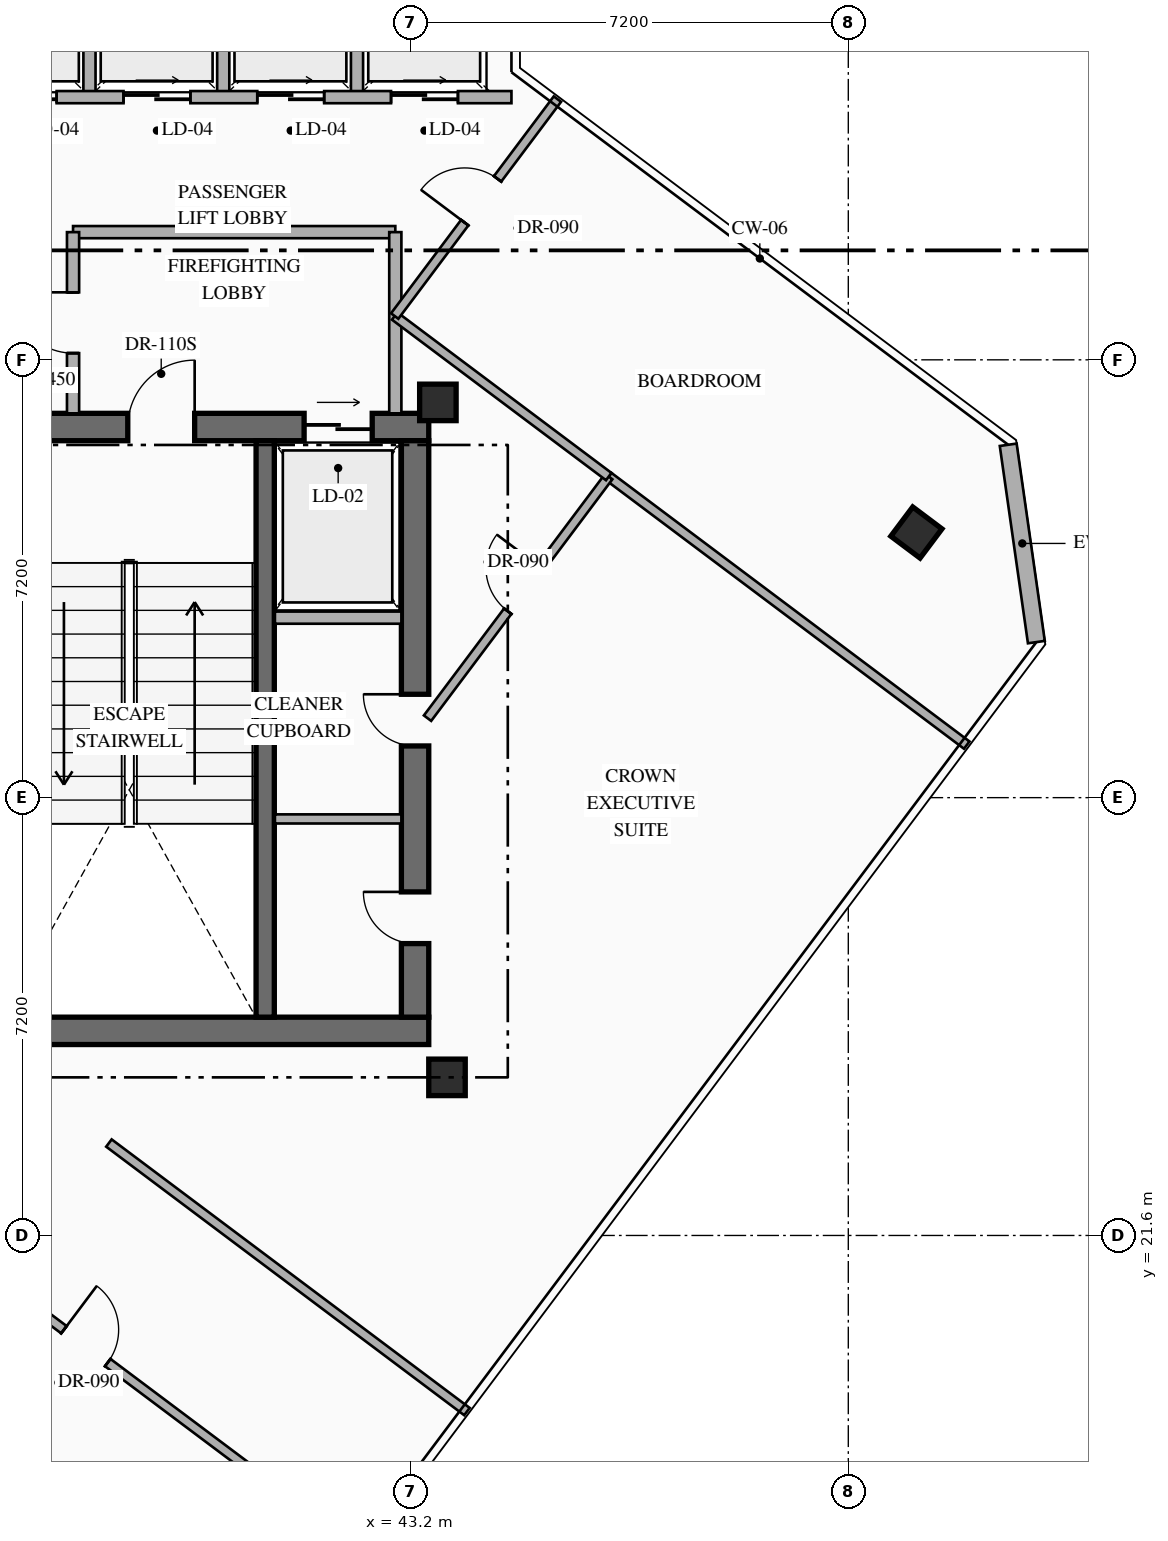
"""IFC4 building model, lengths in metres.
Left out: names, types, materials, properties, quantities, classifications, styles, units other than length and angle.
Written with IfcOpenShell. Run it as: python <this file> out.ifc"""

import sys

from ifc_helpers import new_model, si_unit, direction, frame, frame_2d, origin, origin_2d, place, context, subcontext, project, spatial, rectangle, hollow_rectangle, extrude, element, fill, save


model = new_model("IFC4")
c1 = context("Model", 3, precision=1e-05, world=origin(), true_north=direction((0.0, 1.0)))
c2 = subcontext(c1, "Body", "Model", "MODEL_VIEW")
j1 = project(units=[si_unit("LENGTHUNIT", "METRE"), si_unit("PLANEANGLEUNIT", "RADIAN")], contexts=[c1])
p1 = place(None, origin())
s1 = spatial("IfcSite", under=j1, at=p1, CompositionType="ELEMENT")
p2 = place(p1, origin())
s2 = spatial("IfcBuilding", under=s1, at=p2, CompositionType="ELEMENT")
p3 = place(p2, frame((0.0, 0.0, 269.95)))
s3 = spatial("IfcBuildingStorey", under=s2, at=p3, CompositionType="ELEMENT", Elevation=269.95)
p4 = place(p3, frame((36.04, 24.965, 0.0), z_axis=(0.0, 0.0, 1.0), x_axis=(1.0, 0.0, 0.0)))
e1 = element("IfcWall", 1, at=p4, inside=s3, PredefinedType="SHEAR", context=c2, shape_type="SweptSolid", body=[
    extrude(rectangle(XDim=7.46, YDim=0.45, at=frame_2d((3.73, 0.0))), origin(), (0.0, 0.0, 1.0), 4.0),
])
p5 = place(p3, frame((36.04, 34.895, 0.0), z_axis=(0.0, 0.0, 1.0), x_axis=(1.0, 0.0, 0.0)))
e2 = element("IfcWall", 2, at=p5, inside=s3, PredefinedType="SHEAR", context=c2, shape_type="SweptSolid", body=[
    extrude(rectangle(XDim=7.46, YDim=0.45, at=frame_2d((3.73, 0.0))), origin(), (0.0, 0.0, 1.0), 4.0),
])
p6 = place(p5, frame((2.51, 0.0, 0.0)))
e3 = element("IfcOpeningElement", 3, at=p6, cuts=e2, PredefinedType="OPENING", context=c2, shape_type="SweptSolid", body=[
    extrude(rectangle(XDim=1.1, YDim=2.2, at=frame_2d((0.55, 1.1))), frame((0.0, 0.235, 0.0), z_axis=(0.0, -1.0, 0.0), x_axis=(1.0, 0.0, 0.0)), (0.0, 0.0, 1.0), 0.47),
])
p7 = place(p5, frame((5.41, 0.0, 0.0)))
e4 = element("IfcOpeningElement", 4, at=p7, cuts=e2, PredefinedType="OPENING", context=c2, shape_type="SweptSolid", body=[
    extrude(rectangle(XDim=1.12, YDim=2.15, at=frame_2d((0.56, 1.075))), frame((0.0, 0.235, 0.0), z_axis=(0.0, -1.0, 0.0), x_axis=(1.0, 0.0, 0.0)), (0.0, 0.0, 1.0), 0.47),
])
p8 = place(p3, frame((43.275, 25.19, 0.0), z_axis=(0.0, 0.0, 1.0), x_axis=(0.0, 1.0, 0.0)))
e5 = element("IfcWall", 5, at=p8, inside=s3, PredefinedType="SHEAR", context=c2, shape_type="SweptSolid", body=[
    extrude(rectangle(XDim=9.48, YDim=0.45, at=frame_2d((4.74, 0.0))), origin(), (0.0, 0.0, 1.0), 4.0),
])
p9 = place(p8, frame((1.21, 0.0, 0.0)))
e6 = element("IfcOpeningElement", 6, at=p9, cuts=e5, PredefinedType="OPENING", context=c2, shape_type="SweptSolid", body=[
    extrude(rectangle(XDim=0.85, YDim=2.08, at=frame_2d((0.425, 1.04))), frame((0.0, 0.235, 0.0), z_axis=(0.0, -1.0, 0.0), x_axis=(1.0, 0.0, 0.0)), (0.0, 0.0, 1.0), 0.47),
])
p10 = place(p8, frame((4.46, 0.0, 0.0)))
e7 = element("IfcOpeningElement", 7, at=p10, cuts=e5, PredefinedType="OPENING", context=c2, shape_type="SweptSolid", body=[
    extrude(rectangle(XDim=0.85, YDim=2.08, at=frame_2d((0.425, 1.04))), frame((0.0, 0.235, 0.0), z_axis=(0.0, -1.0, 0.0), x_axis=(1.0, 0.0, 0.0)), (0.0, 0.0, 1.0), 0.47),
])
p11 = place(p3, frame((40.81, 25.19, 0.0), z_axis=(0.0, 0.0, 1.0), x_axis=(0.0, 1.0, 0.0)))
e8 = element("IfcWall", 8, at=p11, inside=s3, PredefinedType="SHEAR", context=c2, shape_type="SweptSolid", body=[
    extrude(rectangle(XDim=9.48, YDim=0.3, at=frame_2d((4.74, 0.0))), origin(), (0.0, 0.0, 1.0), 4.0),
])
for number, where, z_axis, x_axis in (
    (9, (43.8, 24.2, 0.0), (0.0, 0.0, 1.0), (1.0, 0.0, 0.0)),
    (10, (43.65, 35.3, 0.0), (0.0, 0.0, 1.0), (1.0, 0.0, 0.0)),
    (11, (51.52, 33.16, 0.0), (0.0, 0.0, 1.0), (0.8, -0.6, 0.0)),
):
    element("IfcColumn", number, at=place(p3, frame(where, z_axis=z_axis, x_axis=x_axis)), inside=s3, PredefinedType="COLUMN", context=c2, shape_type="SweptSolid", body=[
        extrude(hollow_rectangle(XDim=0.6, YDim=0.6, WallThickness=0.025, at=origin_2d()), origin(), (0.0, 0.0, 1.0), 4.0),
    ])
p12 = place(p3, frame((53.03, 34.603, 0.0), z_axis=(0.0, 0.0, 1.0), x_axis=(0.141212810973, -0.989979263428, 0.0)))
e12 = element("IfcWall", 12, at=p12, inside=s3, PredefinedType="STANDARD", context=c2, shape_type="SweptSolid", body=[
    extrude(rectangle(XDim=3.278, YDim=0.28, at=frame_2d((1.639, 0.0))), origin(), (0.0, 0.0, 1.0), 3.74),
])
p13 = place(p3, frame((40.97, 31.76, 0.0), z_axis=(0.0, 0.0, 1.0), x_axis=(1.0, 0.0, 0.0)))
e13 = element("IfcWall", 13, at=p13, inside=s3, PredefinedType="STANDARD", context=c2, shape_type="SweptSolid", body=[
    extrude(rectangle(XDim=2.08, YDim=0.2, at=frame_2d((1.04, 0.0))), origin(), (0.0, 0.0, 1.0), 3.74),
])
p14 = place(p3, frame((40.97, 28.45, 0.0), z_axis=(0.0, 0.0, 1.0), x_axis=(1.0, 0.0, 0.0)))
e14 = element("IfcWall", 14, at=p14, inside=s3, PredefinedType="PARTITIONING", context=c2, shape_type="SweptSolid", body=[
    extrude(rectangle(XDim=2.08, YDim=0.15, at=frame_2d((1.04, 0.0))), origin(), (0.0, 0.0, 1.0), 3.74),
])
p15 = place(p3, frame((37.65, 38.1, 0.0), z_axis=(0.0, 0.0, 1.0), x_axis=(1.0, 0.0, 0.0)))
e15 = element("IfcWall", 15, at=p15, inside=s3, PredefinedType="STANDARD", context=c2, shape_type="SweptSolid", body=[
    extrude(rectangle(XDim=5.3, YDim=0.2, at=frame_2d((2.65, 0.0))), origin(), (0.0, 0.0, 1.0), 3.74),
])
p16 = place(p3, frame((42.95, 35.12, 0.0), z_axis=(0.0, 0.0, 1.0), x_axis=(0.0, 1.0, 0.0)))
e16 = element("IfcWall", 16, at=p16, inside=s3, PredefinedType="STANDARD", context=c2, shape_type="SweptSolid", body=[
    extrude(rectangle(XDim=2.98, YDim=0.2, at=frame_2d((1.49, 0.0))), origin(), (0.0, 0.0, 1.0), 3.74),
])
p17 = place(p3, frame((37.65, 35.12, 0.0), z_axis=(0.0, 0.0, 1.0), x_axis=(0.0, 1.0, 0.0)))
e17 = element("IfcWall", 17, at=p17, inside=s3, PredefinedType="STANDARD", context=c2, shape_type="SweptSolid", body=[
    extrude(rectangle(XDim=2.98, YDim=0.2, at=frame_2d((1.49, 0.0))), origin(), (0.0, 0.0, 1.0), 3.74),
])
p18 = place(p17, frame((0.99, 0.0, 0.0)))
e18 = element("IfcOpeningElement", 18, at=p18, cuts=e17, PredefinedType="OPENING", context=c2, shape_type="SweptSolid", body=[
    extrude(rectangle(XDim=1.0, YDim=2.2, at=frame_2d((0.5, 1.1))), frame((0.0, 0.11, 0.0), z_axis=(0.0, -1.0, 0.0), x_axis=(1.0, 0.0, 0.0)), (0.0, 0.0, 1.0), 0.22),
])
for number, where, z_axis, x_axis in (
    (19, (37.92, 40.32, 0.0), (0.0, 0.0, 1.0), (0.0, 1.0, 0.0)),
    (20, (40.12, 40.32, 0.0), (0.0, 0.0, 1.0), (0.0, 1.0, 0.0)),
    (21, (42.32, 40.32, 0.0), (0.0, 0.0, 1.0), (0.0, 1.0, 0.0)),
):
    element("IfcWall", number, at=place(p3, frame(where, z_axis=z_axis, x_axis=x_axis)), inside=s3, PredefinedType="STANDARD", context=c2, shape_type="SweptSolid", body=[
        extrude(rectangle(XDim=2.16, YDim=0.2, at=frame_2d((1.08, 0.0))), origin(), (0.0, 0.0, 1.0), 3.74),
    ])
p19 = place(p3, frame((35.75, 40.32, 0.0), z_axis=(0.0, 0.0, 1.0), x_axis=(1.0, 0.0, 0.0)))
e22 = element("IfcWall", 22, at=p19, inside=s3, PredefinedType="STANDARD", context=c2, shape_type="SweptSolid", body=[
    extrude(rectangle(XDim=9.11, YDim=0.2, at=frame_2d((4.555, 0.0))), origin(), (0.0, 0.0, 1.0), 3.74),
])
p20 = place(p19, frame((0.53, 0.0, 0.0)))
e23 = element("IfcOpeningElement", 23, at=p20, cuts=e22, PredefinedType="OPENING", context=c2, shape_type="SweptSolid", body=[
    extrude(rectangle(XDim=1.1, YDim=2.18, at=frame_2d((0.55, 1.09))), frame((0.0, 0.11, 0.0), z_axis=(0.0, -1.0, 0.0), x_axis=(1.0, 0.0, 0.0)), (0.0, 0.0, 1.0), 0.22),
])
p21 = place(p19, frame((2.73, 0.0, 0.0)))
e24 = element("IfcOpeningElement", 24, at=p21, cuts=e22, PredefinedType="OPENING", context=c2, shape_type="SweptSolid", body=[
    extrude(rectangle(XDim=1.1, YDim=2.18, at=frame_2d((0.55, 1.09))), frame((0.0, 0.11, 0.0), z_axis=(0.0, -1.0, 0.0), x_axis=(1.0, 0.0, 0.0)), (0.0, 0.0, 1.0), 0.22),
])
p22 = place(p19, frame((4.93, 0.0, 0.0)))
e25 = element("IfcOpeningElement", 25, at=p22, cuts=e22, PredefinedType="OPENING", context=c2, shape_type="SweptSolid", body=[
    extrude(rectangle(XDim=1.1, YDim=2.18, at=frame_2d((0.55, 1.09))), frame((0.0, 0.11, 0.0), z_axis=(0.0, -1.0, 0.0), x_axis=(1.0, 0.0, 0.0)), (0.0, 0.0, 1.0), 0.22),
])
p23 = place(p19, frame((7.13, 0.0, 0.0)))
e26 = element("IfcOpeningElement", 26, at=p23, cuts=e22, PredefinedType="OPENING", context=c2, shape_type="SweptSolid", body=[
    extrude(rectangle(XDim=1.1, YDim=2.18, at=frame_2d((0.55, 1.09))), frame((0.0, 0.11, 0.0), z_axis=(0.0, -1.0, 0.0), x_axis=(1.0, 0.0, 0.0)), (0.0, 0.0, 1.0), 0.22),
])
p24 = place(p3, frame((28.18, 27.04, 0.0), z_axis=(0.0, 0.0, 1.0), x_axis=(0.8, -0.6, 0.0)))
e27 = element("IfcWall", 27, at=p24, inside=s3, PredefinedType="PARTITIONING", context=c2, shape_type="SweptSolid", body=[
    extrude(rectangle(XDim=17.76, YDim=0.15, at=frame_2d((8.88, 0.0))), origin(), (0.0, 0.0, 1.0), 3.74),
])
p25 = place(p24, frame((11.65, 0.0, 0.0)))
e28 = element("IfcOpeningElement", 28, at=p25, cuts=e27, PredefinedType="OPENING", context=c2, shape_type="SweptSolid", body=[
    extrude(rectangle(XDim=0.9, YDim=2.15, at=frame_2d((0.45, 1.075))), frame((0.0, 0.085, 0.0), z_axis=(0.0, -1.0, 0.0), x_axis=(1.0, 0.0, 0.0)), (0.0, 0.0, 1.0), 0.17),
])
for number, where, z_axis, x_axis in (
    (29, (38.24, 23.12, 0.0), (0.0, 0.0, 1.0), (0.8, -0.6, 0.0)),
    (30, (46.46, 34.08, 0.0), (0.0, 0.0, 1.0), (0.8, -0.6, 0.0)),
):
    element("IfcWall", number, at=place(p3, frame(where, z_axis=z_axis, x_axis=x_axis)), inside=s3, PredefinedType="PARTITIONING", context=c2, shape_type="SweptSolid", body=[
        extrude(rectangle(XDim=7.36, YDim=0.15, at=frame_2d((3.68, 0.0))), origin(), (0.0, 0.0, 1.0), 3.74),
    ])
p26 = place(p3, frame((43.48, 30.107, 0.0), z_axis=(0.0, 0.0, 1.0), x_axis=(0.600015730265, 0.799988202059, 0.0)))
e31 = element("IfcWall", 31, at=p26, inside=s3, PredefinedType="PARTITIONING", context=c2, shape_type="SweptSolid", body=[
    extrude(rectangle(XDim=4.967, YDim=0.15, at=frame_2d((2.483, 0.0))), origin(), (0.0, 0.0, 1.0), 3.74),
])
p27 = place(p26, frame((2.199, 0.0, 0.0)))
e32 = element("IfcOpeningElement", 32, at=p27, cuts=e31, PredefinedType="OPENING", context=c2, shape_type="SweptSolid", body=[
    extrude(rectangle(XDim=0.9, YDim=2.15, at=frame_2d((0.45, 1.075))), frame((0.0, 0.085, 0.0), z_axis=(0.0, -1.0, 0.0), x_axis=(1.0, 0.0, 0.0)), (0.0, 0.0, 1.0), 0.17),
])
p28 = place(p3, frame((42.94, 36.72, 0.0), z_axis=(0.0, 0.0, 1.0), x_axis=(0.800013316712, -0.599982243973, 0.0)))
e33 = element("IfcWall", 33, at=p28, inside=s3, PredefinedType="PARTITIONING", context=c2, shape_type="SweptSolid", body=[
    extrude(rectangle(XDim=4.4, YDim=0.15, at=frame_2d((2.2, 0.0))), origin(), (0.0, 0.0, 1.0), 3.295),
])
p29 = place(p3, frame((42.94, 36.72, 0.0), z_axis=(0.0, 0.0, 1.0), x_axis=(0.599991241767, 0.8000065686, 0.0)))
e34 = element("IfcWall", 34, at=p29, inside=s3, PredefinedType="PARTITIONING", context=c2, shape_type="SweptSolid", body=[
    extrude(rectangle(XDim=4.46, YDim=0.15, at=frame_2d((2.23, 0.0))), origin(), (0.0, 0.0, 1.0), 3.74),
])
p30 = place(p29, frame((1.92, 0.0, 0.0)))
e35 = element("IfcOpeningElement", 35, at=p30, cuts=e34, PredefinedType="OPENING", context=c2, shape_type="SweptSolid", body=[
    extrude(rectangle(XDim=0.9, YDim=2.15, at=frame_2d((0.45, 1.075))), frame((0.0, 0.085, 0.0), z_axis=(0.0, -1.0, 0.0), x_axis=(1.0, 0.0, 0.0)), (0.0, 0.0, 1.0), 0.17),
])
p31 = place(p6, origin())
e36 = element("IfcDoor", 36, at=p31, inside=s3, OperationType="SINGLE_SWING_RIGHT", PredefinedType="DOOR", context=c2, shape_type="SweptSolid", body=[
    extrude(rectangle(XDim=1.1, YDim=2.2, at=frame_2d((0.55, 1.1))), frame((0.0, 0.025, 0.0), z_axis=(0.0, -1.0, 0.0), x_axis=(1.0, 0.0, 0.0)), (0.0, 0.0, 1.0), 0.05),
])
fill(e3, e36)
p32 = place(p7, origin())
e37 = element("IfcDoor", 37, at=p32, inside=s3, OperationType="SLIDING_TO_RIGHT", PredefinedType="USERDEFINED", context=c2, shape_type="SweptSolid", body=[
    extrude(rectangle(XDim=1.12, YDim=2.15, at=frame_2d((0.56, 1.075))), frame((0.0, 0.025, 0.0), z_axis=(0.0, -1.0, 0.0), x_axis=(1.0, 0.0, 0.0)), (0.0, 0.0, 1.0), 0.05),
])
fill(e4, e37)
p33 = place(p9, origin())
e38 = element("IfcDoor", 38, at=p33, inside=s3, OperationType="SINGLE_SWING_RIGHT", PredefinedType="DOOR", context=c2, shape_type="SweptSolid", body=[
    extrude(rectangle(XDim=0.85, YDim=2.08, at=frame_2d((0.425, 1.04))), frame((0.0, 0.025, 0.0), z_axis=(0.0, -1.0, 0.0), x_axis=(1.0, 0.0, 0.0)), (0.0, 0.0, 1.0), 0.05),
])
fill(e6, e38)
p34 = place(p10, origin())
e39 = element("IfcDoor", 39, at=p34, inside=s3, OperationType="SINGLE_SWING_RIGHT", PredefinedType="DOOR", context=c2, shape_type="SweptSolid", body=[
    extrude(rectangle(XDim=0.85, YDim=2.08, at=frame_2d((0.425, 1.04))), frame((0.0, 0.025, 0.0), z_axis=(0.0, -1.0, 0.0), x_axis=(1.0, 0.0, 0.0)), (0.0, 0.0, 1.0), 0.05),
])
fill(e7, e39)
p35 = place(p18, origin())
e40 = element("IfcDoor", 40, at=p35, inside=s3, OperationType="SINGLE_SWING_RIGHT", PredefinedType="DOOR", context=c2, shape_type="SweptSolid", body=[
    extrude(rectangle(XDim=1.0, YDim=2.2, at=frame_2d((0.5, 1.1))), frame((0.0, 0.025, 0.0), z_axis=(0.0, -1.0, 0.0), x_axis=(1.0, 0.0, 0.0)), (0.0, 0.0, 1.0), 0.05),
])
fill(e18, e40)
p36 = place(p20, origin())
e41 = element("IfcDoor", 41, at=p36, inside=s3, OperationType="SLIDING_TO_RIGHT", PredefinedType="USERDEFINED", context=c2, shape_type="SweptSolid", body=[
    extrude(rectangle(XDim=1.1, YDim=2.18, at=frame_2d((0.55, 1.09))), frame((0.0, 0.025, 0.0), z_axis=(0.0, -1.0, 0.0), x_axis=(1.0, 0.0, 0.0)), (0.0, 0.0, 1.0), 0.05),
])
fill(e23, e41)
p37 = place(p21, origin())
e42 = element("IfcDoor", 42, at=p37, inside=s3, OperationType="SLIDING_TO_RIGHT", PredefinedType="USERDEFINED", context=c2, shape_type="SweptSolid", body=[
    extrude(rectangle(XDim=1.1, YDim=2.18, at=frame_2d((0.55, 1.09))), frame((0.0, 0.025, 0.0), z_axis=(0.0, -1.0, 0.0), x_axis=(1.0, 0.0, 0.0)), (0.0, 0.0, 1.0), 0.05),
])
fill(e24, e42)
p38 = place(p22, origin())
e43 = element("IfcDoor", 43, at=p38, inside=s3, OperationType="SLIDING_TO_RIGHT", PredefinedType="USERDEFINED", context=c2, shape_type="SweptSolid", body=[
    extrude(rectangle(XDim=1.1, YDim=2.18, at=frame_2d((0.55, 1.09))), frame((0.0, 0.025, 0.0), z_axis=(0.0, -1.0, 0.0), x_axis=(1.0, 0.0, 0.0)), (0.0, 0.0, 1.0), 0.05),
])
fill(e25, e43)
p39 = place(p23, origin())
e44 = element("IfcDoor", 44, at=p39, inside=s3, OperationType="SLIDING_TO_RIGHT", PredefinedType="USERDEFINED", context=c2, shape_type="SweptSolid", body=[
    extrude(rectangle(XDim=1.1, YDim=2.18, at=frame_2d((0.55, 1.09))), frame((0.0, 0.025, 0.0), z_axis=(0.0, -1.0, 0.0), x_axis=(1.0, 0.0, 0.0)), (0.0, 0.0, 1.0), 0.05),
])
fill(e26, e44)
p40 = place(p25, origin())
e45 = element("IfcDoor", 45, at=p40, inside=s3, OperationType="SINGLE_SWING_LEFT", PredefinedType="DOOR", context=c2, shape_type="SweptSolid", body=[
    extrude(rectangle(XDim=0.9, YDim=2.15, at=frame_2d((0.45, 1.075))), frame((0.0, 0.025, 0.0), z_axis=(0.0, -1.0, 0.0), x_axis=(1.0, 0.0, 0.0)), (0.0, 0.0, 1.0), 0.05),
])
fill(e28, e45)
p41 = place(p27, origin())
e46 = element("IfcDoor", 46, at=p41, inside=s3, OperationType="SINGLE_SWING_RIGHT", PredefinedType="DOOR", context=c2, shape_type="SweptSolid", body=[
    extrude(rectangle(XDim=0.9, YDim=2.15, at=frame_2d((0.45, 1.075))), frame((0.0, 0.025, 0.0), z_axis=(0.0, -1.0, 0.0), x_axis=(1.0, 0.0, 0.0)), (0.0, 0.0, 1.0), 0.05),
])
fill(e32, e46)
p42 = place(p30, origin())
e47 = element("IfcDoor", 47, at=p42, inside=s3, OperationType="SINGLE_SWING_LEFT", PredefinedType="DOOR", context=c2, shape_type="SweptSolid", body=[
    extrude(rectangle(XDim=0.9, YDim=2.15, at=frame_2d((0.45, 1.075))), frame((0.0, 0.025, 0.0), z_axis=(0.0, -1.0, 0.0), x_axis=(1.0, 0.0, 0.0)), (0.0, 0.0, 1.0), 0.05),
])
fill(e35, e47)
save(model, sys.argv[1])
